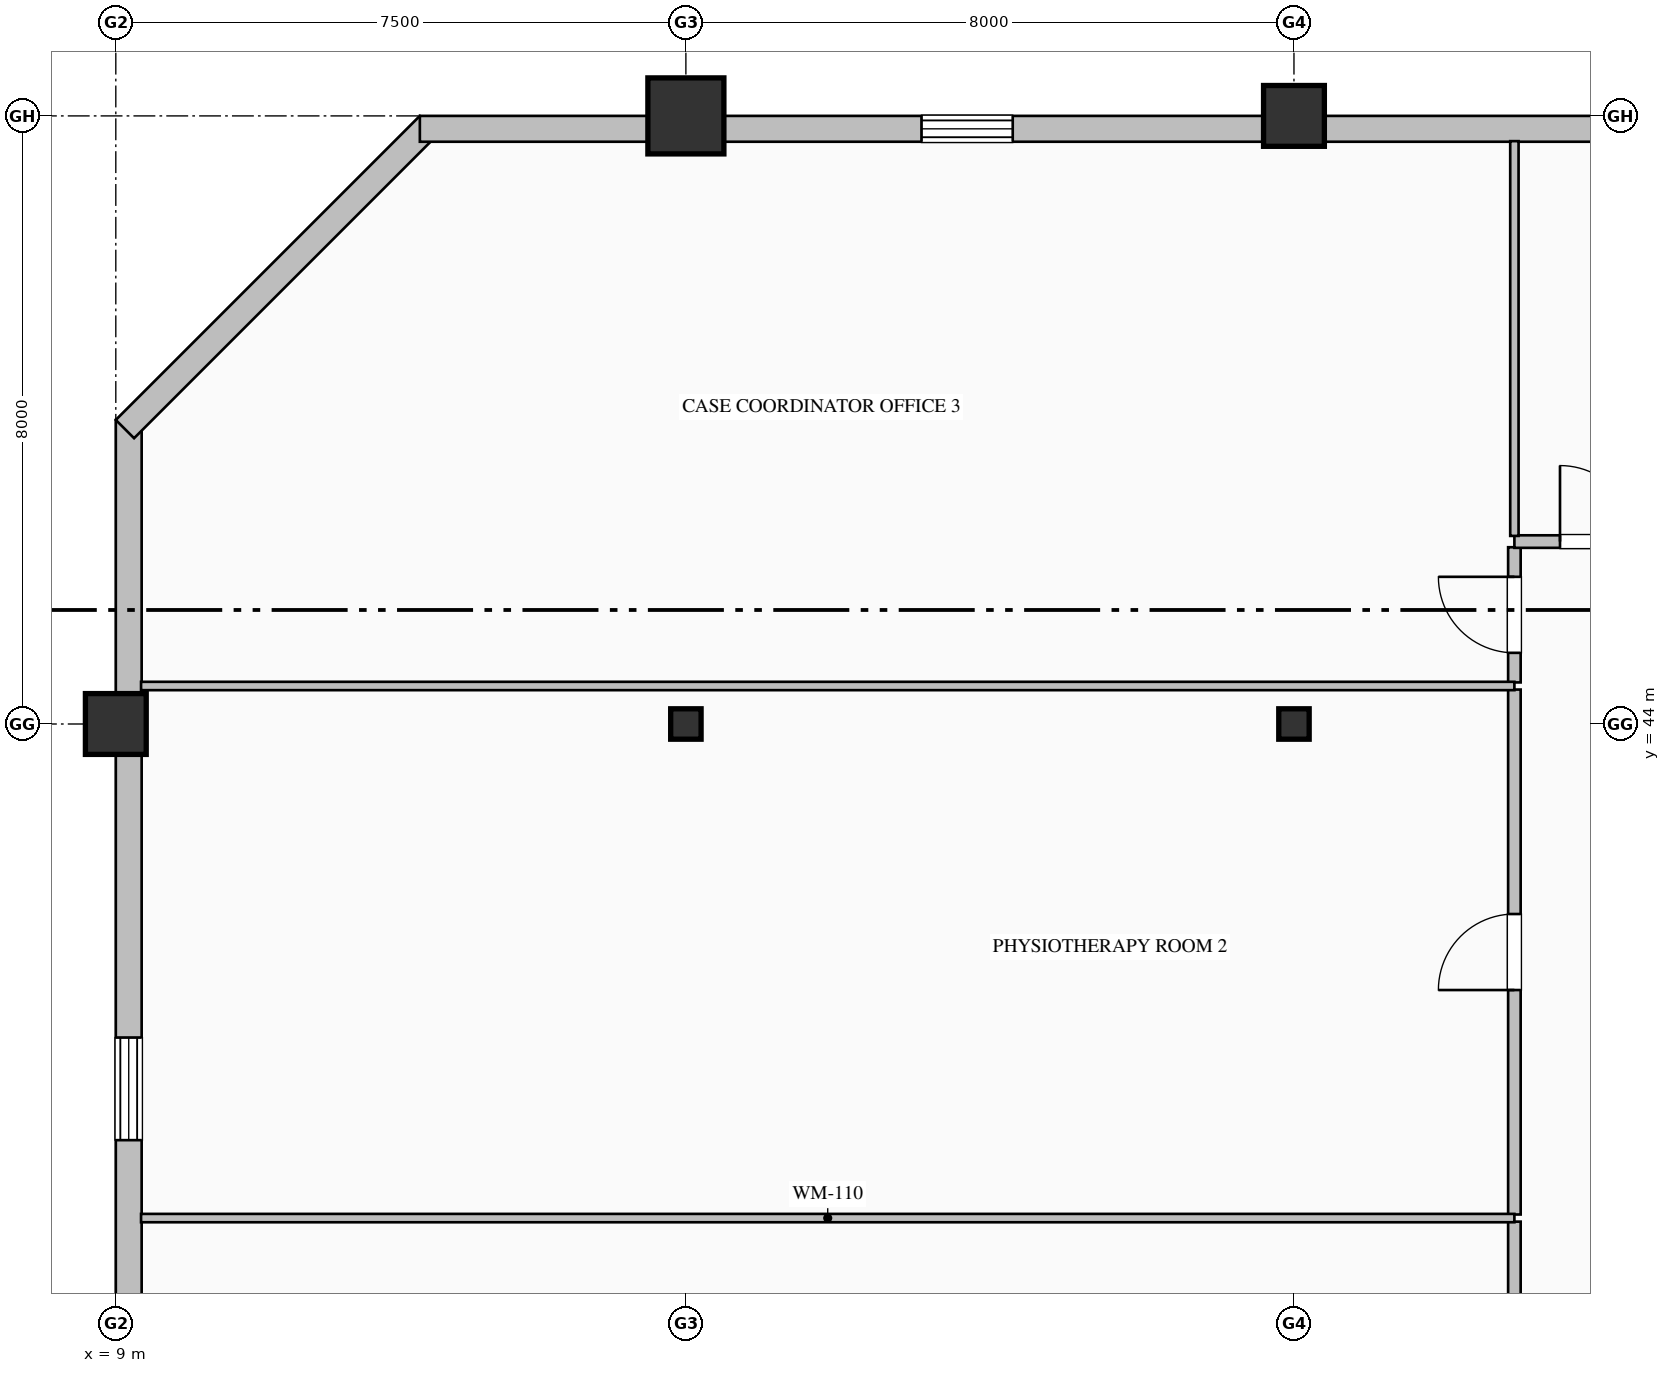
"""IFC4 building model, lengths in metres.
Left out: names, types, materials, properties, quantities, classifications, styles, units other than length and angle.
Written with IfcOpenShell. Run it as: python <this file> out.ifc"""

import sys

from ifc_helpers import new_model, si_unit, direction, frame, frame_2d, origin, origin_2d, place, context, subcontext, project, spatial, rectangle, hollow_rectangle, hollow_circle, i_section, extrude, element, fill, save


model = new_model("IFC4")
c1 = context("Model", 3, precision=1e-05, world=origin(), true_north=direction((0.0, 1.0)))
c2 = subcontext(c1, "Body", "Model", "MODEL_VIEW")
j1 = project(units=[si_unit("LENGTHUNIT", "METRE"), si_unit("PLANEANGLEUNIT", "RADIAN")], contexts=[c1])
p1 = place(None, origin())
s1 = spatial("IfcSite", under=j1, at=p1, CompositionType="ELEMENT")
p2 = place(p1, origin())
s2 = spatial("IfcBuilding", under=s1, at=p2, CompositionType="ELEMENT")
p3 = place(p2, frame((0.0, 0.0, 261.8)))
s3 = spatial("IfcBuildingStorey", under=s2, at=p3, CompositionType="ELEMENT", Elevation=261.8)
p4 = place(p3, frame((9.0, 44.0, 0.0), z_axis=(0.0, 0.0, 1.0), x_axis=(1.0, 0.0, 0.0)))
e1 = element("IfcColumn", 1, at=p4, inside=s3, PredefinedType="COLUMN", context=c2, shape_type="SweptSolid", body=[
    extrude(hollow_rectangle(XDim=0.8, YDim=0.8, WallThickness=0.032, at=origin_2d()), origin(), (0.0, 0.0, 1.0), 4.0),
])
p5 = place(p3, frame((16.5, 44.0, 0.0), z_axis=(0.0, 0.0, 1.0), x_axis=(1.0, 0.0, 0.0)))
e2 = element("IfcColumn", 2, at=p5, inside=s3, PredefinedType="COLUMN", context=c2, shape_type="SweptSolid", body=[
    extrude(i_section(OverallWidth=0.4, OverallDepth=0.4, WebThickness=0.013, FlangeThickness=0.021, FilletRadius=0.022, at=origin_2d()), origin(), (0.0, 0.0, 1.0), 4.0),
])
p6 = place(p3, frame((16.5, 52.0, 0.0), z_axis=(0.0, 0.0, 1.0), x_axis=(1.0, 0.0, 0.0)))
e3 = element("IfcColumn", 3, at=p6, inside=s3, PredefinedType="COLUMN", context=c2, shape_type="SweptSolid", body=[
    extrude(hollow_circle(Radius=0.5, WallThickness=0.036, at=origin_2d()), origin(), (0.0, 0.0, 1.0), 4.0),
])
p7 = place(p3, frame((24.5, 44.0, 0.0), z_axis=(0.0, 0.0, 1.0), x_axis=(1.0, 0.0, 0.0)))
e4 = element("IfcColumn", 4, at=p7, inside=s3, PredefinedType="COLUMN", context=c2, shape_type="SweptSolid", body=[
    extrude(i_section(OverallWidth=0.4, OverallDepth=0.4, WebThickness=0.013, FlangeThickness=0.021, FilletRadius=0.022, at=origin_2d()), origin(), (0.0, 0.0, 1.0), 4.0),
])
p8 = place(p3, frame((24.5, 52.0, 0.0), z_axis=(0.0, 0.0, 1.0), x_axis=(1.0, 0.0, 0.0)))
e5 = element("IfcColumn", 5, at=p8, inside=s3, PredefinedType="COLUMN", context=c2, shape_type="SweptSolid", body=[
    extrude(hollow_rectangle(XDim=0.8, YDim=0.8, WallThickness=0.032, at=origin_2d()), origin(), (0.0, 0.0, 1.0), 4.0),
])
p9 = place(p3, frame((9.17, 32.0, 0.0), z_axis=(0.0, 0.0, 1.0), x_axis=(0.0, 1.0, 0.0)))
e6 = element("IfcWall", 6, at=p9, inside=s3, PredefinedType="SOLIDWALL", context=c2, shape_type="SweptSolid", body=[
    extrude(rectangle(XDim=16.0, YDim=0.34, at=frame_2d((8.0, 0.0))), origin(), (0.0, 0.0, 1.0), 3.325),
])
p10 = place(p9, frame((6.525, 0.0, 0.9)))
e7 = element("IfcOpeningElement", 7, at=p10, cuts=e6, PredefinedType="OPENING", context=c2, shape_type="SweptSolid", body=[
    extrude(rectangle(XDim=1.35, YDim=1.85, at=frame_2d((0.675, 0.925))), frame((0.0, 0.18, 0.0), z_axis=(0.0, -1.0, 0.0), x_axis=(1.0, 0.0, 0.0)), (0.0, 0.0, 1.0), 0.36),
])
p11 = place(p3, frame((9.12, 47.88, 0.0), z_axis=(0.0, 0.0, 1.0), x_axis=(0.707106781187, 0.707106781187, 0.0)))
e8 = element("IfcWall", 8, at=p11, inside=s3, PredefinedType="SOLIDWALL", context=c2, shape_type="SweptSolid", body=[
    extrude(rectangle(XDim=5.657, YDim=0.34, at=frame_2d((2.828, 0.0))), origin(), (0.0, 0.0, 1.0), 3.775),
])
p12 = place(p3, frame((13.0, 51.83, 0.0), z_axis=(0.0, 0.0, 1.0), x_axis=(1.0, 0.0, 0.0)))
e9 = element("IfcWall", 9, at=p12, inside=s3, PredefinedType="SOLIDWALL", context=c2, shape_type="SweptSolid", body=[
    extrude(rectangle(XDim=27.52, YDim=0.34, at=frame_2d((13.76, 0.0))), origin(), (0.0, 0.0, 1.0), 3.325),
])
p13 = place(p12, frame((6.6, 0.0, 0.9)))
e10 = element("IfcOpeningElement", 10, at=p13, cuts=e9, PredefinedType="OPENING", context=c2, shape_type="SweptSolid", body=[
    extrude(rectangle(XDim=1.2, YDim=1.85, at=frame_2d((0.6, 0.925))), frame((0.0, 0.18, 0.0), z_axis=(0.0, -1.0, 0.0), x_axis=(1.0, 0.0, 0.0)), (0.0, 0.0, 1.0), 0.36),
])
p14 = place(p12, frame((17.4, 0.0, 0.9)))
e11 = element("IfcOpeningElement", 11, at=p14, cuts=e9, PredefinedType="OPENING", context=c2, shape_type="SweptSolid", body=[
    extrude(rectangle(XDim=1.2, YDim=1.85, at=frame_2d((0.6, 0.925))), frame((0.0, 0.18, 0.0), z_axis=(0.0, -1.0, 0.0), x_axis=(1.0, 0.0, 0.0)), (0.0, 0.0, 1.0), 0.36),
])
p15 = place(p3, frame((27.4, 32.675, 0.0), z_axis=(0.0, 0.0, 1.0), x_axis=(0.0, 1.0, 0.0)))
e12 = element("IfcWall", 12, at=p15, inside=s3, PredefinedType="PARTITIONING", context=c2, shape_type="SweptSolid", body=[
    extrude(rectangle(XDim=4.778, YDim=0.165, at=frame_2d((2.389, 0.0))), origin(), (0.0, 0.0, 1.0), 3.775),
])
p16 = place(p3, frame((27.4, 37.547, 0.0), z_axis=(0.0, 0.0, 1.0), x_axis=(0.0, 1.0, 0.0)))
e13 = element("IfcWall", 13, at=p16, inside=s3, PredefinedType="PARTITIONING", context=c2, shape_type="SweptSolid", body=[
    extrude(rectangle(XDim=6.906, YDim=0.165, at=frame_2d((3.453, 0.0))), origin(), (0.0, 0.0, 1.0), 3.775),
])
p17 = place(p16, frame((2.953, 0.0, 0.0)))
e14 = element("IfcOpeningElement", 14, at=p17, cuts=e13, PredefinedType="OPENING", context=c2, shape_type="SweptSolid", body=[
    extrude(rectangle(XDim=1.0, YDim=2.15, at=frame_2d((0.5, 1.075))), frame((0.0, 0.093, 0.0), z_axis=(0.0, -1.0, 0.0), x_axis=(1.0, 0.0, 0.0)), (0.0, 0.0, 1.0), 0.185),
])
p18 = place(p3, frame((27.4, 44.547, 0.0), z_axis=(0.0, 0.0, 1.0), x_axis=(0.0, 1.0, 0.0)))
e15 = element("IfcWall", 15, at=p18, inside=s3, PredefinedType="PARTITIONING", context=c2, shape_type="SweptSolid", body=[
    extrude(rectangle(XDim=1.778, YDim=0.165, at=frame_2d((0.889, 0.0))), origin(), (0.0, 0.0, 1.0), 3.775),
])
p19 = place(p18, frame((0.389, 0.0, 0.0)))
e16 = element("IfcOpeningElement", 16, at=p19, cuts=e15, PredefinedType="OPENING", context=c2, shape_type="SweptSolid", body=[
    extrude(rectangle(XDim=1.0, YDim=2.15, at=frame_2d((0.5, 1.075))), frame((0.0, 0.093, 0.0), z_axis=(0.0, -1.0, 0.0), x_axis=(1.0, 0.0, 0.0)), (0.0, 0.0, 1.0), 0.185),
])
p20 = place(p3, frame((27.4, 46.4, 0.0), z_axis=(0.0, 0.0, 1.0), x_axis=(1.0, 0.0, 0.0)))
e17 = element("IfcWall", 17, at=p20, inside=s3, PredefinedType="PARTITIONING", context=c2, shape_type="SweptSolid", body=[
    extrude(rectangle(XDim=2.2, YDim=0.165, at=frame_2d((1.1, 0.0))), origin(), (0.0, 0.0, 1.0), 3.775),
])
p21 = place(p20, frame((0.6, 0.0, 0.0)))
e18 = element("IfcOpeningElement", 18, at=p21, cuts=e17, PredefinedType="OPENING", context=c2, shape_type="SweptSolid", body=[
    extrude(rectangle(XDim=1.0, YDim=2.15, at=frame_2d((0.5, 1.075))), frame((0.0, 0.093, 0.0), z_axis=(0.0, -1.0, 0.0), x_axis=(1.0, 0.0, 0.0)), (0.0, 0.0, 1.0), 0.185),
])
for number, where, z_axis, x_axis in (
    (19, (9.332, 37.5, 0.0), (0.0, 0.0, 1.0), (1.0, 0.0, 0.0)),
    (20, (9.332, 44.5, 0.0), (0.0, 0.0, 1.0), (1.0, 0.0, 0.0)),
):
    element("IfcWall", number, at=place(p3, frame(where, z_axis=z_axis, x_axis=x_axis)), inside=s3, PredefinedType="MOVABLE", context=c2, shape_type="SweptSolid", body=[
        extrude(rectangle(XDim=18.068, YDim=0.11, at=frame_2d((9.034, 0.0))), origin(), (0.0, 0.0, 1.0), 3.775),
    ])
p22 = place(p3, frame((27.4, 51.668, 0.0), z_axis=(0.0, 0.0, 1.0), x_axis=(0.0, -1.0, 0.0)))
e21 = element("IfcWall", 21, at=p22, inside=s3, PredefinedType="MOVABLE", context=c2, shape_type="SweptSolid", body=[
    extrude(rectangle(XDim=5.193, YDim=0.11, at=frame_2d((2.597, 0.0))), origin(), (0.0, 0.0, 1.0), 3.775),
])
p23 = place(p10, origin())
e22 = element("IfcWindow", 22, at=p23, inside=s3, PartitioningType="DOUBLE_PANEL_VERTICAL", PredefinedType="WINDOW", context=c2, shape_type="SweptSolid", body=[
    extrude(rectangle(XDim=1.35, YDim=1.85, at=frame_2d((0.675, 0.925))), frame((0.0, 0.15, 0.0), z_axis=(0.0, -1.0, 0.0), x_axis=(1.0, 0.0, 0.0)), (0.0, 0.0, 1.0), 0.06),
])
fill(e7, e22)
p24 = place(p13, origin())
e23 = element("IfcWindow", 23, at=p24, inside=s3, PartitioningType="DOUBLE_PANEL_VERTICAL", PredefinedType="WINDOW", context=c2, shape_type="SweptSolid", body=[
    extrude(rectangle(XDim=1.2, YDim=1.85, at=frame_2d((0.6, 0.925))), frame((0.0, 0.15, 0.0), z_axis=(0.0, -1.0, 0.0), x_axis=(1.0, 0.0, 0.0)), (0.0, 0.0, 1.0), 0.06),
])
fill(e10, e23)
p25 = place(p17, origin())
e24 = element("IfcDoor", 24, at=p25, inside=s3, OperationType="SINGLE_SWING_LEFT", PredefinedType="DOOR", context=c2, shape_type="SweptSolid", body=[
    extrude(rectangle(XDim=1.0, YDim=2.15, at=frame_2d((0.5, 1.075))), frame((0.0, 0.025, 0.0), z_axis=(0.0, -1.0, 0.0), x_axis=(1.0, 0.0, 0.0)), (0.0, 0.0, 1.0), 0.05),
])
fill(e14, e24)
p26 = place(p19, origin())
e25 = element("IfcDoor", 25, at=p26, inside=s3, OperationType="SINGLE_SWING_RIGHT", PredefinedType="DOOR", context=c2, shape_type="SweptSolid", body=[
    extrude(rectangle(XDim=1.0, YDim=2.15, at=frame_2d((0.5, 1.075))), frame((0.0, 0.025, 0.0), z_axis=(0.0, -1.0, 0.0), x_axis=(1.0, 0.0, 0.0)), (0.0, 0.0, 1.0), 0.05),
])
fill(e16, e25)
p27 = place(p21, origin())
e26 = element("IfcDoor", 26, at=p27, inside=s3, OperationType="SINGLE_SWING_LEFT", PredefinedType="DOOR", context=c2, shape_type="SweptSolid", body=[
    extrude(rectangle(XDim=1.0, YDim=2.15, at=frame_2d((0.5, 1.075))), frame((0.0, 0.025, 0.0), z_axis=(0.0, -1.0, 0.0), x_axis=(1.0, 0.0, 0.0)), (0.0, 0.0, 1.0), 0.05),
])
fill(e18, e26)
save(model, sys.argv[1])
